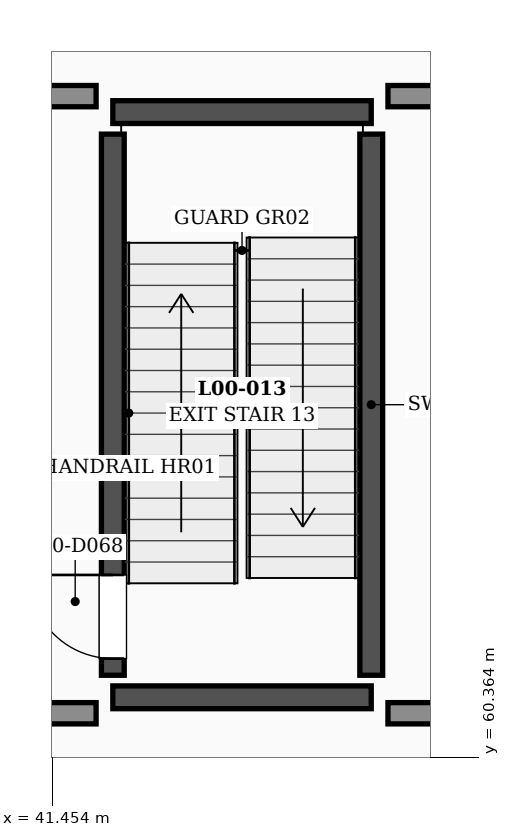
"""IFC4 building model, lengths in metres.
Left out: names, types, materials, properties, quantities, classifications, styles, units other than length and angle.
Written with IfcOpenShell. Run it as: python <this file> out.ifc"""

import sys

from ifc_helpers import new_model, si_unit, direction, frame, frame_2d, origin, place, context, subcontext, project, spatial, rectangle, extrude, element, fill, save


model = new_model("IFC4")
c1 = context("Model", 3, precision=1e-05, world=origin(), true_north=direction((0.0, 1.0)))
c2 = subcontext(c1, "Body", "Model", "MODEL_VIEW")
j1 = project(units=[si_unit("LENGTHUNIT", "METRE"), si_unit("PLANEANGLEUNIT", "RADIAN")], contexts=[c1])
p1 = place(None, origin())
s1 = spatial("IfcSite", under=j1, at=p1, CompositionType="ELEMENT")
p2 = place(p1, origin())
s2 = spatial("IfcBuilding", under=s1, at=p2, CompositionType="ELEMENT")
p3 = place(p2, origin())
s3 = spatial("IfcBuildingStorey", under=s2, at=p3, CompositionType="ELEMENT", Elevation=0.0)
for number, where, z_axis, x_axis in (
    (1, (42.25, 61.15, 0.0), (0.0, 0.0, 1.0), (1.0, 0.0, 0.0)),
    (2, (42.25, 68.85, 0.0), (0.0, 0.0, 1.0), (1.0, 0.0, 0.0)),
):
    element("IfcWall", number, at=place(p3, frame(where, z_axis=z_axis, x_axis=x_axis)), inside=s3, PredefinedType="SHEAR", context=c2, shape_type="SweptSolid", body=[
        extrude(rectangle(XDim=3.4, YDim=0.3, at=frame_2d((1.7, 0.0))), origin(), (0.0, 0.0, 1.0), 6.0),
    ])
p4 = place(p3, frame((42.25, 61.44, 0.0), z_axis=(0.0, 0.0, 1.0), x_axis=(0.0, 1.0, 0.0)))
e3 = element("IfcWall", 3, at=p4, inside=s3, PredefinedType="SHEAR", context=c2, shape_type="SweptSolid", body=[
    extrude(rectangle(XDim=7.12, YDim=0.3, at=frame_2d((3.56, 0.0))), origin(), (0.0, 0.0, 1.0), 6.0),
])
p5 = place(p4, frame((0.22, 0.0, 0.0)))
e4 = element("IfcOpeningElement", 4, at=p5, cuts=e3, PredefinedType="OPENING", context=c2, shape_type="SweptSolid", body=[
    extrude(rectangle(XDim=1.1, YDim=2.2, at=frame_2d((0.55, 1.1))), frame((0.0, 0.16, 0.0), z_axis=(0.0, -1.0, 0.0), x_axis=(1.0, 0.0, 0.0)), (0.0, 0.0, 1.0), 0.32),
])
p6 = place(p3, frame((45.65, 61.44, 0.0), z_axis=(0.0, 0.0, 1.0), x_axis=(0.0, 1.0, 0.0)))
e5 = element("IfcWall", 5, at=p6, inside=s3, PredefinedType="SHEAR", context=c2, shape_type="SweptSolid", body=[
    extrude(rectangle(XDim=7.12, YDim=0.3, at=frame_2d((3.56, 0.0))), origin(), (0.0, 0.0, 1.0), 6.0),
])
p7 = place(p3, frame((34.68, 60.94, 0.0), z_axis=(0.0, 0.0, 1.0), x_axis=(1.0, 0.0, 0.0)))
e6 = element("IfcWall", 6, at=p7, inside=s3, PredefinedType="PARTITIONING", context=c2, shape_type="SweptSolid", body=[
    extrude(rectangle(XDim=7.35, YDim=0.28, at=frame_2d((3.675, 0.0))), origin(), (0.0, 0.0, 1.0), 4.57),
])
for number, where, z_axis, x_axis in (
    (7, (45.87, 60.94, 0.0), (0.0, 0.0, 1.0), (1.0, 0.0, 0.0)),
    (8, (48.33, 69.06, 0.0), (0.0, 0.0, 1.0), (-1.0, 0.0, 0.0)),
):
    element("IfcWall", number, at=place(p3, frame(where, z_axis=z_axis, x_axis=x_axis)), inside=s3, PredefinedType="PARTITIONING", context=c2, shape_type="SweptSolid", body=[
        extrude(rectangle(XDim=2.46, YDim=0.28, at=frame_2d((1.23, 0.0))), origin(), (0.0, 0.0, 1.0), 4.97),
    ])
p8 = place(p3, frame((42.03, 69.06, 0.0), z_axis=(0.0, 0.0, 1.0), x_axis=(-1.0, 0.0, 0.0)))
e9 = element("IfcWall", 9, at=p8, inside=s3, PredefinedType="PARTITIONING", context=c2, shape_type="SweptSolid", body=[
    extrude(rectangle(XDim=7.35, YDim=0.28, at=frame_2d((3.675, 0.0))), origin(), (0.0, 0.0, 1.0), 4.57),
])
p9 = place(p5, origin())
e10 = element("IfcDoor", 10, at=p9, inside=s3, OperationType="SINGLE_SWING_RIGHT", PredefinedType="DOOR", context=c2, shape_type="SweptSolid", body=[
    extrude(rectangle(XDim=1.1, YDim=2.2, at=frame_2d((0.55, 1.1))), frame((0.0, 0.025, 0.0), z_axis=(0.0, -1.0, 0.0), x_axis=(1.0, 0.0, 0.0)), (0.0, 0.0, 1.0), 0.05),
])
fill(e4, e10)
save(model, sys.argv[1])
